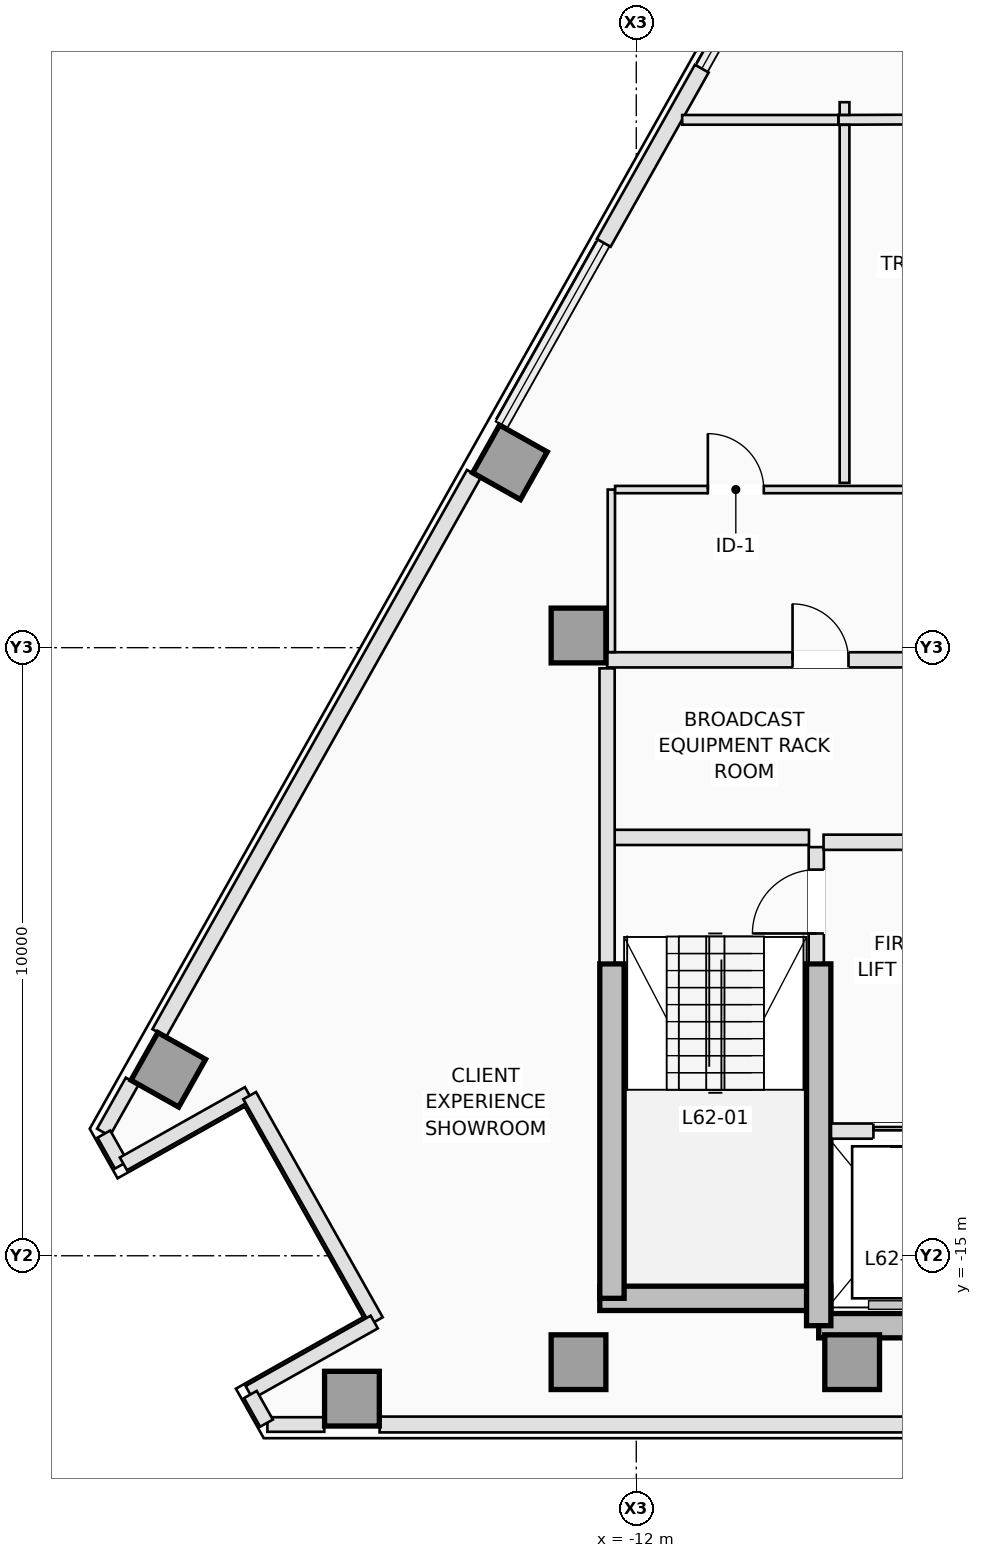
"""IFC4 building model, lengths in metres.
Left out: names, types, materials, properties, quantities, classifications, styles, units other than length and angle.
Written with IfcOpenShell. Run it as: python <this file> out.ifc"""

import sys

from ifc_helpers import new_model, si_unit, direction, frame, frame_2d, origin, origin_2d, place, context, subcontext, project, spatial, rectangle, extrude, element, fill, save


model = new_model("IFC4")
c1 = context("Model", 3, precision=1e-05, world=origin(), true_north=direction((0.0, 1.0)))
c2 = subcontext(c1, "Body", "Model", "MODEL_VIEW")
j1 = project(units=[si_unit("LENGTHUNIT", "METRE"), si_unit("PLANEANGLEUNIT", "RADIAN")], contexts=[c1])
p1 = place(None, origin())
s1 = spatial("IfcSite", under=j1, at=p1, CompositionType="ELEMENT")
p2 = place(p1, origin())
s2 = spatial("IfcBuilding", under=s1, at=p2, CompositionType="ELEMENT")
p3 = place(p2, frame((0.0, 0.0, 225.4)))
s3 = spatial("IfcBuildingStorey", under=s2, at=p3, CompositionType="ELEMENT", Elevation=225.4)
p4 = place(p3, frame((-12.6, -15.7, 0.0), z_axis=(0.0, 0.0, 1.0), x_axis=(1.0, 0.0, 0.0)))
e1 = element("IfcWall", 1, at=p4, inside=s3, PredefinedType="SHEAR", context=c2, shape_type="SweptSolid", body=[
    extrude(rectangle(XDim=3.8, YDim=0.4, at=frame_2d((1.9, 0.0))), origin(), (0.0, 0.0, 1.0), 3.5),
])
p5 = place(p3, frame((-9.0, -16.15, 0.0), z_axis=(0.0, 0.0, 1.0), x_axis=(1.0, 0.0, 0.0)))
e2 = element("IfcWall", 2, at=p5, inside=s3, PredefinedType="SHEAR", context=c2, shape_type="SweptSolid", body=[
    extrude(rectangle(XDim=5.25, YDim=0.4, at=frame_2d((2.625, 0.0))), origin(), (0.0, 0.0, 1.0), 3.5),
])
p6 = place(p3, frame((-12.4, -15.7, 0.0), z_axis=(0.0, 0.0, 1.0), x_axis=(0.0, 1.0, 0.0)))
e3 = element("IfcWall", 3, at=p6, inside=s3, PredefinedType="SHEAR", context=c2, shape_type="SweptSolid", body=[
    extrude(rectangle(XDim=5.5, YDim=0.4, at=frame_2d((2.75, 0.0))), origin(), (0.0, 0.0, 1.0), 3.5),
])
p7 = place(p3, frame((-9.0, -16.15, 0.0), z_axis=(0.0, 0.0, 1.0), x_axis=(0.0, 1.0, 0.0)))
e4 = element("IfcWall", 4, at=p7, inside=s3, PredefinedType="SHEAR", context=c2, shape_type="SweptSolid", body=[
    extrude(rectangle(XDim=5.95, YDim=0.4, at=frame_2d((2.975, 0.0))), origin(), (0.0, 0.0, 1.0), 3.5),
])
for number, where, z_axis, x_axis in (
    (5, (-12.95, -16.75, 0.0), (0.0, 0.0, 1.0), (1.0, 0.0, 0.0)),
    (6, (-8.45, -16.75, 0.0), (0.0, 0.0, 1.0), (1.0, 0.0, 0.0)),
    (7, (-12.95, -4.8, 0.0), (0.0, 0.0, 1.0), (1.0, 0.0, 0.0)),
    (8, (-16.676, -17.35, 0.0), (0.0, 0.0, 1.0), (0.0, 1.0, 0.0)),
    (9, (-14.077, -1.952, 0.0), (0.0, 0.0, 1.0), (-0.872, 0.49, 0.0)),
    (10, (-19.697, -11.942, 0.0), (0.0, 0.0, 1.0), (-0.872, 0.49, 0.0)),
):
    element("IfcColumn", number, at=place(p3, frame(where, z_axis=z_axis, x_axis=x_axis)), inside=s3, PredefinedType="COLUMN", context=c2, shape_type="SweptSolid", body=[
        extrude(rectangle(XDim=0.9, YDim=0.9, at=origin_2d()), origin(), (0.0, 0.0, 1.0), 3.5),
    ])
p8 = place(p3, frame((-17.131, -17.775, 0.0), z_axis=(0.0, 0.0, 1.0), x_axis=(-1.0, 0.0, 0.0)))
e11 = element("IfcWall", 11, at=p8, inside=s3, PredefinedType="STANDARD", context=c2, shape_type="SweptSolid", body=[
    extrude(rectangle(XDim=0.935, YDim=0.24, at=frame_2d((0.468, 0.0))), origin(), (0.0, 0.0, 1.0), 3.25),
])
p9 = place(p3, frame((-5.893, -17.775, 0.0), z_axis=(0.0, 0.0, 1.0), x_axis=(-1.0, 0.0, 0.0)))
e12 = element("IfcWall", 12, at=p9, inside=s3, PredefinedType="STANDARD", context=c2, shape_type="SweptSolid", body=[
    extrude(rectangle(XDim=10.328, YDim=0.26, at=frame_2d((5.164, 0.0))), origin(), (0.0, 0.0, 1.0), 1.75),
])
p10 = place(p3, frame((-20.762, -12.97, 0.0), z_axis=(0.0, 0.0, 1.0), x_axis=(0.490345412687, 0.87152818443, 0.0)))
e13 = element("IfcWall", 13, at=p10, inside=s3, PredefinedType="STANDARD", context=c2, shape_type="SweptSolid", body=[
    extrude(rectangle(XDim=0.964, YDim=0.24, at=frame_2d((0.482, 0.0))), origin(), (0.0, 0.0, 1.0), 3.25),
])
p11 = place(p3, frame((-19.844, -11.337, 0.0), z_axis=(0.0, 0.0, 1.0), x_axis=(0.490246958575, 0.871583570066, 0.0)))
e14 = element("IfcWall", 14, at=p11, inside=s3, PredefinedType="STANDARD", context=c2, shape_type="SweptSolid", body=[
    extrude(rectangle(XDim=10.552, YDim=0.26, at=frame_2d((5.276, 0.0))), origin(), (0.0, 0.0, 1.0), 1.75),
])
p12 = place(p3, frame((-12.535, 1.657, 0.0), z_axis=(0.0, 0.0, 1.0), x_axis=(0.490264765862, 0.871573553611, 0.0)))
e15 = element("IfcWall", 15, at=p12, inside=s3, PredefinedType="STANDARD", context=c2, shape_type="SweptSolid", body=[
    extrude(rectangle(XDim=3.287, YDim=0.26, at=frame_2d((1.644, 0.0))), origin(), (0.0, 0.0, 1.0), 1.75),
])
p13 = place(p3, frame((-20.755, -12.999, 0.0), z_axis=(0.0, 0.0, 1.0), x_axis=(0.490320776404, -0.871542045014, 0.0)))
e16 = element("IfcWall", 16, at=p13, inside=s3, PredefinedType="STANDARD", context=c2, shape_type="SweptSolid", body=[
    extrude(rectangle(XDim=0.584, YDim=0.24, at=frame_2d((0.292, 0.0))), origin(), (0.0, 0.0, 1.0), 3.25),
])
p14 = place(p3, frame((-20.434, -13.489, 0.0), z_axis=(0.0, 0.0, 1.0), x_axis=(0.871578299909, 0.490256327984, 0.0)))
e17 = element("IfcWall", 17, at=p14, inside=s3, PredefinedType="STANDARD", context=c2, shape_type="SweptSolid", body=[
    extrude(rectangle(XDim=2.36, YDim=0.24, at=frame_2d((1.18, 0.0))), origin(), (0.0, 0.0, 1.0), 3.25),
])
p15 = place(p3, frame((-18.358, -12.366, 0.0), z_axis=(0.0, 0.0, 1.0), x_axis=(0.49027487746, -0.871567865706, 0.0)))
e18 = element("IfcWall", 18, at=p15, inside=s3, PredefinedType="STANDARD", context=c2, shape_type="SweptSolid", body=[
    extrude(rectangle(XDim=4.25, YDim=0.24, at=frame_2d((2.125, 0.0))), origin(), (0.0, 0.0, 1.0), 1.75),
])
p16 = place(p3, frame((-16.309, -16.09, 0.0), z_axis=(0.0, 0.0, 1.0), x_axis=(-0.871578299909, -0.490256327984, 0.0)))
e19 = element("IfcWall", 19, at=p16, inside=s3, PredefinedType="STANDARD", context=c2, shape_type="SweptSolid", body=[
    extrude(rectangle(XDim=2.36, YDim=0.24, at=frame_2d((1.18, 0.0))), origin(), (0.0, 0.0, 1.0), 3.25),
])
p17 = place(p3, frame((-18.346, -17.282, 0.0), z_axis=(0.0, 0.0, 1.0), x_axis=(0.49038986747, -0.87150317147, 0.0)))
e20 = element("IfcWall", 20, at=p17, inside=s3, PredefinedType="STANDARD", context=c2, shape_type="SweptSolid", body=[
    extrude(rectangle(XDim=0.541, YDim=0.24, at=frame_2d((0.271, 0.0))), origin(), (0.0, 0.0, 1.0), 3.25),
])
p18 = place(p3, frame((-9.04, -10.18, 0.0), z_axis=(0.0, 0.0, 1.0), x_axis=(0.0, 1.0, 0.0)))
e21 = element("IfcWall", 21, at=p18, inside=s3, PredefinedType="PARTITIONING", context=c2, shape_type="SweptSolid", body=[
    extrude(rectangle(XDim=1.9, YDim=0.25, at=frame_2d((0.95, 0.0))), origin(), (0.0, 0.0, 1.0), 3.25),
])
p19 = place(p18, frame((0.48, 0.0, 0.0)))
e22 = element("IfcOpeningElement", 22, at=p19, cuts=e21, PredefinedType="OPENING", context=c2, shape_type="SweptSolid", body=[
    extrude(rectangle(XDim=1.05, YDim=2.15, at=frame_2d((0.525, 1.075))), frame((0.0, 0.135, 0.0), z_axis=(0.0, -1.0, 0.0), x_axis=(1.0, 0.0, 0.0)), (0.0, 0.0, 1.0), 0.27),
])
p20 = place(p3, frame((-12.38, -8.12, 0.0), z_axis=(0.0, 0.0, 1.0), x_axis=(1.0, 0.0, 0.0)))
e23 = element("IfcWall", 23, at=p20, inside=s3, PredefinedType="PARTITIONING", context=c2, shape_type="SweptSolid", body=[
    extrude(rectangle(XDim=3.22, YDim=0.25, at=frame_2d((1.61, 0.0))), origin(), (0.0, 0.0, 1.0), 3.25),
])
p21 = place(p3, frame((-12.48, -10.18, 0.0), z_axis=(0.0, 0.0, 1.0), x_axis=(0.0, 1.0, 0.0)))
e24 = element("IfcWall", 24, at=p21, inside=s3, PredefinedType="PARTITIONING", context=c2, shape_type="SweptSolid", body=[
    extrude(rectangle(XDim=4.84, YDim=0.25, at=frame_2d((2.42, 0.0))), origin(), (0.0, 0.0, 1.0), 3.25),
])
p22 = place(p3, frame((-8.798, -12.95, 0.0), z_axis=(0.0, 0.0, 1.0), x_axis=(1.0, 0.0, 0.0)))
e25 = element("IfcWall", 25, at=p22, inside=s3, PredefinedType="PARTITIONING", context=c2, shape_type="SweptSolid", body=[
    extrude(rectangle(XDim=5.118, YDim=0.25, at=frame_2d((2.559, 0.0))), origin(), (0.0, 0.0, 1.0), 3.25),
])
p23 = place(p22, frame((0.698, 0.0, 0.0)))
e26 = element("IfcOpeningElement", 26, at=p23, cuts=e25, PredefinedType="OPENING", context=c2, shape_type="SweptSolid", body=[
    extrude(rectangle(XDim=1.1, YDim=2.15, at=frame_2d((0.55, 1.075))), frame((0.0, 0.135, 0.0), z_axis=(0.0, -1.0, 0.0), x_axis=(1.0, 0.0, 0.0)), (0.0, 0.0, 1.0), 0.27),
])
p24 = place(p22, frame((2.598, 0.0, 0.0)))
e27 = element("IfcOpeningElement", 27, at=p24, cuts=e25, PredefinedType="OPENING", context=c2, shape_type="SweptSolid", body=[
    extrude(rectangle(XDim=0.88, YDim=2.1, at=frame_2d((0.44, 1.05))), frame((0.0, 0.135, 0.0), z_axis=(0.0, -1.0, 0.0), x_axis=(1.0, 0.0, 0.0)), (0.0, 0.0, 1.0), 0.27),
])
p25 = place(p22, frame((3.998, 0.0, 0.0)))
e28 = element("IfcOpeningElement", 28, at=p25, cuts=e25, PredefinedType="OPENING", context=c2, shape_type="SweptSolid", body=[
    extrude(rectangle(XDim=0.88, YDim=2.1, at=frame_2d((0.44, 1.05))), frame((0.0, 0.135, 0.0), z_axis=(0.0, -1.0, 0.0), x_axis=(1.0, 0.0, 0.0)), (0.0, 0.0, 1.0), 0.27),
])
p26 = place(p3, frame((-8.92, -8.2, 0.0), z_axis=(0.0, 0.0, 1.0), x_axis=(1.0, 0.0, 0.0)))
e29 = element("IfcWall", 29, at=p26, inside=s3, PredefinedType="PARTITIONING", context=c2, shape_type="SweptSolid", body=[
    extrude(rectangle(XDim=5.24, YDim=0.25, at=frame_2d((2.62, 0.0))), origin(), (0.0, 0.0, 1.0), 3.25),
])
p27 = place(p3, frame((-12.48, -5.2, 0.0), z_axis=(0.0, 0.0, 1.0), x_axis=(1.0, 0.0, 0.0)))
e30 = element("IfcWall", 30, at=p27, inside=s3, PredefinedType="PARTITIONING", context=c2, shape_type="SweptSolid", body=[
    extrude(rectangle(XDim=8.278, YDim=0.25, at=frame_2d((4.139, 0.0))), origin(), (0.0, 0.0, 1.0), 3.25),
])
p28 = place(p27, frame((3.05, 0.0, 0.0)))
e31 = element("IfcOpeningElement", 31, at=p28, cuts=e30, PredefinedType="OPENING", context=c2, shape_type="SweptSolid", body=[
    extrude(rectangle(XDim=0.92, YDim=2.12, at=frame_2d((0.46, 1.06))), frame((0.0, 0.135, 0.0), z_axis=(0.0, -1.0, 0.0), x_axis=(1.0, 0.0, 0.0)), (0.0, 0.0, 1.0), 0.27),
])
p29 = place(p27, frame((6.15, 0.0, 0.0)))
e32 = element("IfcOpeningElement", 32, at=p29, cuts=e30, PredefinedType="OPENING", context=c2, shape_type="SweptSolid", body=[
    extrude(rectangle(XDim=0.92, YDim=2.12, at=frame_2d((0.46, 1.06))), frame((0.0, 0.135, 0.0), z_axis=(0.0, -1.0, 0.0), x_axis=(1.0, 0.0, 0.0)), (0.0, 0.0, 1.0), 0.27),
])
p30 = place(p3, frame((-12.41, -5.073, 0.0), z_axis=(0.0, 0.0, 1.0), x_axis=(0.0, 1.0, 0.0)))
e33 = element("IfcWall", 33, at=p30, inside=s3, PredefinedType="PARTITIONING", context=c2, shape_type="SweptSolid", body=[
    extrude(rectangle(XDim=2.673, YDim=0.12, at=frame_2d((1.336, 0.0))), origin(), (0.0, 0.0, 1.0), 3.25),
])
p31 = place(p3, frame((-12.348, -2.4, 0.0), z_axis=(0.0, 0.0, 1.0), x_axis=(1.0, 0.0, 0.0)))
e34 = element("IfcWall", 34, at=p31, inside=s3, PredefinedType="PARTITIONING", context=c2, shape_type="SweptSolid", body=[
    extrude(rectangle(XDim=8.186, YDim=0.12, at=frame_2d((4.093, 0.0))), origin(), (0.0, 0.0, 1.0), 2.943),
])
p32 = place(p31, frame((5.11, 0.0, 0.0)))
e35 = element("IfcOpeningElement", 35, at=p32, cuts=e34, PredefinedType="OPENING", context=c2, shape_type="SweptSolid", body=[
    extrude(rectangle(XDim=0.92, YDim=2.12, at=frame_2d((0.46, 1.06))), frame((0.0, 0.07, 0.0), z_axis=(0.0, -1.0, 0.0), x_axis=(1.0, 0.0, 0.0)), (0.0, 0.0, 1.0), 0.14),
])
p33 = place(p31, frame((1.525, 0.0, 0.0)))
e36 = element("IfcOpeningElement", 36, at=p33, cuts=e34, PredefinedType="OPENING", context=c2, shape_type="SweptSolid", body=[
    extrude(rectangle(XDim=0.92, YDim=2.12, at=frame_2d((0.46, 1.06))), frame((0.0, 0.07, 0.0), z_axis=(0.0, -1.0, 0.0), x_axis=(1.0, 0.0, 0.0)), (0.0, 0.0, 1.0), 0.14),
])
p34 = place(p3, frame((-4.88, 3.695, 0.0), z_axis=(0.0, 0.0, 1.0), x_axis=(-0.999992047368, -0.003988132442, 0.0)))
e37 = element("IfcWall", 37, at=p34, inside=s3, PredefinedType="PARTITIONING", context=c2, shape_type="SweptSolid", body=[
    extrude(rectangle(XDim=3.795, YDim=0.16, at=frame_2d((1.898, 0.0))), origin(), (0.0, 0.0, 1.0), 3.25),
])
p35 = place(p3, frame((-8.677, 3.68, 0.0), z_axis=(0.0, 0.0, 1.0), x_axis=(-1.0, 0.0, 0.0)))
e38 = element("IfcWall", 38, at=p35, inside=s3, PredefinedType="PARTITIONING", context=c2, shape_type="SweptSolid", body=[
    extrude(rectangle(XDim=2.568, YDim=0.16, at=frame_2d((1.284, 0.0))), origin(), (0.0, 0.0, 1.0), 3.25),
])
p36 = place(p3, frame((-8.575, -2.29, 0.0), z_axis=(0.0, 0.0, 1.0), x_axis=(0.0, 1.0, 0.0)))
e39 = element("IfcWall", 39, at=p36, inside=s3, PredefinedType="PARTITIONING", context=c2, shape_type="SweptSolid", body=[
    extrude(rectangle(XDim=5.888, YDim=0.16, at=frame_2d((2.944, 0.0))), origin(), (0.0, 0.0, 1.0), 3.25),
])
p37 = place(p3, frame((-8.575, 3.762, 0.0), z_axis=(0.0, 0.0, 1.0), x_axis=(0.0, 1.0, 0.0)))
e40 = element("IfcWall", 40, at=p37, inside=s3, PredefinedType="PARTITIONING", context=c2, shape_type="SweptSolid", body=[
    extrude(rectangle(XDim=0.208, YDim=0.16, at=frame_2d((0.104, 0.0))), origin(), (0.0, 0.0, 1.0), 3.25),
])
p38 = place(p23, origin())
e41 = element("IfcDoor", 41, at=p38, inside=s3, OperationType="SLIDING_TO_LEFT", PredefinedType="DOOR", context=c2, shape_type="SweptSolid", body=[
    extrude(rectangle(XDim=1.1, YDim=2.15, at=frame_2d((0.55, 1.075))), frame((0.0, 0.025, 0.0), z_axis=(0.0, -1.0, 0.0), x_axis=(1.0, 0.0, 0.0)), (0.0, 0.0, 1.0), 0.05),
])
fill(e26, e41)
p39 = place(p19, origin())
e42 = element("IfcDoor", 42, at=p39, inside=s3, OperationType="SINGLE_SWING_LEFT", PredefinedType="DOOR", context=c2, shape_type="SweptSolid", body=[
    extrude(rectangle(XDim=1.05, YDim=2.15, at=frame_2d((0.525, 1.075))), frame((0.0, 0.025, 0.0), z_axis=(0.0, -1.0, 0.0), x_axis=(1.0, 0.0, 0.0)), (0.0, 0.0, 1.0), 0.05),
])
fill(e22, e42)
p40 = place(p28, origin())
e43 = element("IfcDoor", 43, at=p40, inside=s3, OperationType="SINGLE_SWING_LEFT", PredefinedType="DOOR", context=c2, shape_type="SweptSolid", body=[
    extrude(rectangle(XDim=0.92, YDim=2.12, at=frame_2d((0.46, 1.06))), frame((0.0, 0.025, 0.0), z_axis=(0.0, -1.0, 0.0), x_axis=(1.0, 0.0, 0.0)), (0.0, 0.0, 1.0), 0.05),
])
fill(e31, e43)
p41 = place(p33, origin())
e44 = element("IfcDoor", 44, at=p41, inside=s3, OperationType="SINGLE_SWING_LEFT", PredefinedType="DOOR", context=c2, shape_type="SweptSolid", body=[
    extrude(rectangle(XDim=0.92, YDim=2.12, at=frame_2d((0.46, 1.06))), frame((0.0, 0.025, 0.0), z_axis=(0.0, -1.0, 0.0), x_axis=(1.0, 0.0, 0.0)), (0.0, 0.0, 1.0), 0.05),
])
fill(e36, e44)
save(model, sys.argv[1])
